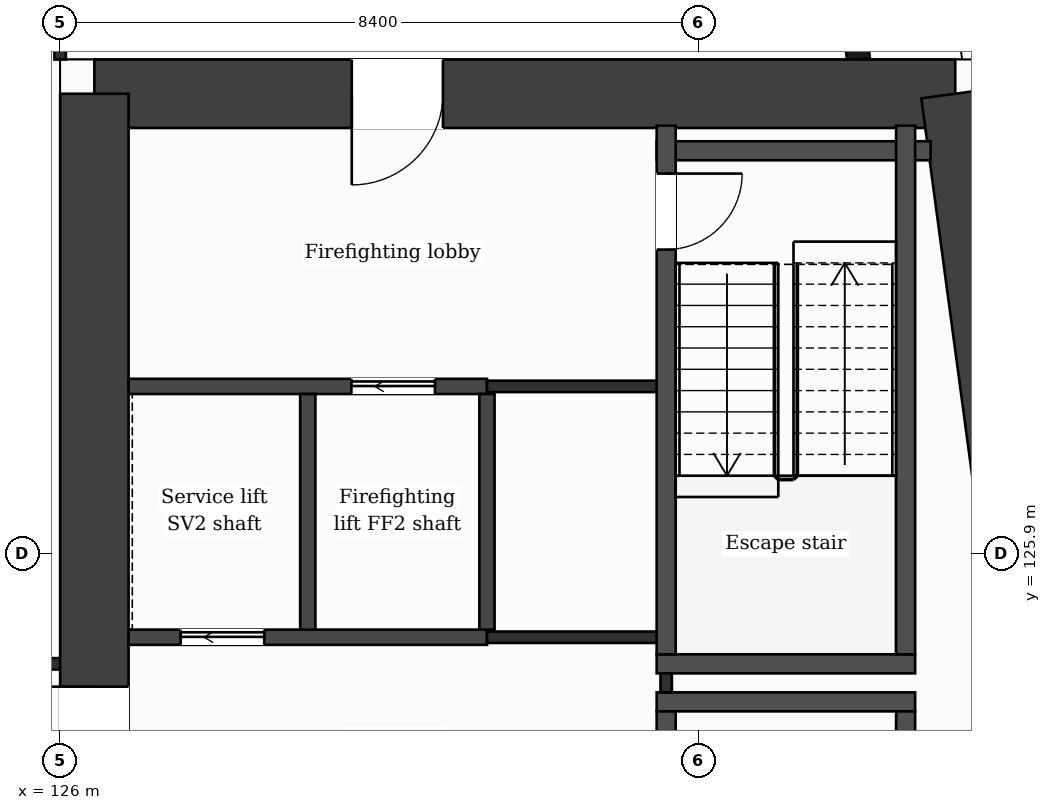
"""IFC4 building model, lengths in metres.
Left out: names, types, materials, properties, quantities, classifications, styles, units other than length and angle.
Written with IfcOpenShell. Run it as: python <this file> out.ifc"""

import sys

from ifc_helpers import new_model, si_unit, direction, frame, frame_2d, origin, place, context, subcontext, project, spatial, rectangle, extrude, element, fill, save


model = new_model("IFC4")
c1 = context("Model", 3, precision=1e-05, world=origin(), true_north=direction((0.0, 1.0)))
c2 = subcontext(c1, "Body", "Model", "MODEL_VIEW")
j1 = project(units=[si_unit("LENGTHUNIT", "METRE"), si_unit("PLANEANGLEUNIT", "RADIAN")], contexts=[c1])
p1 = place(None, origin())
s1 = spatial("IfcSite", under=j1, at=p1, CompositionType="ELEMENT")
p2 = place(p1, origin())
s2 = spatial("IfcBuilding", under=s1, at=p2, CompositionType="ELEMENT")
p3 = place(p2, frame((0.0, 0.0, 181.1)))
s3 = spatial("IfcBuildingStorey", under=s2, at=p3, CompositionType="ELEMENT", Elevation=181.1)
p4 = place(p3, frame((126.45, 131.95, 0.0), z_axis=(0.0, 0.0, 1.0), x_axis=(1.0, 0.0, 0.0)))
e1 = element("IfcWall", 1, at=p4, inside=s3, PredefinedType="SHEAR", context=c2, shape_type="SweptSolid", body=[
    extrude(rectangle(XDim=11.326, YDim=0.9, at=frame_2d((5.663, 0.0))), origin(), (0.0, 0.0, 1.0), 3.7),
])
p5 = place(p4, frame((3.386, 0.0, 0.0)))
e2 = element("IfcOpeningElement", 2, at=p5, cuts=e1, PredefinedType="OPENING", context=c2, shape_type="SweptSolid", body=[
    extrude(rectangle(XDim=1.2, YDim=2.1, at=frame_2d((0.6, 1.05))), frame((0.0, 0.46, 0.0), z_axis=(0.0, -1.0, 0.0), x_axis=(1.0, 0.0, 0.0)), (0.0, 0.0, 1.0), 0.92),
])
p6 = place(p3, frame((137.776, 131.95, 0.0), z_axis=(0.0, 0.0, 1.0), x_axis=(0.133421759112, -0.991059349482, 0.0)))
e3 = element("IfcWall", 3, at=p6, inside=s3, PredefinedType="SHEAR", context=c2, shape_type="SweptSolid", body=[
    extrude(rectangle(XDim=21.29, YDim=0.9, at=frame_2d((10.645, 0.0))), origin(), (0.0, 0.0, 1.0), 3.7),
])
p7 = place(p3, frame((126.45, 110.85, 0.0), z_axis=(0.0, 0.0, 1.0), x_axis=(0.0, 1.0, 0.0)))
e4 = element("IfcWall", 4, at=p7, inside=s3, PredefinedType="SHEAR", context=c2, shape_type="SweptSolid", body=[
    extrude(rectangle(XDim=21.1, YDim=0.9, at=frame_2d((10.55, 0.0))), origin(), (0.0, 0.0, 1.0), 3.7),
])
p8 = place(p7, frame((11.9, 0.0, 0.0)))
e5 = element("IfcOpeningElement", 5, at=p8, cuts=e4, PredefinedType="OPENING", context=c2, shape_type="SweptSolid", body=[
    extrude(rectangle(XDim=1.4, YDim=2.1, at=frame_2d((0.7, 1.05))), frame((0.0, 0.46, 0.0), z_axis=(0.0, -1.0, 0.0), x_axis=(1.0, 0.0, 0.0)), (0.0, 0.0, 1.0), 0.92),
])
p9 = place(p3, frame((136.504, 132.4, 0.0), z_axis=(0.0, 0.0, 1.0), x_axis=(-0.133399697462, 0.99106231929, 0.0)))
e6 = element("IfcWall", 6, at=p9, inside=s3, PredefinedType="SOLIDWALL", context=c2, shape_type="SweptSolid", body=[
    extrude(rectangle(XDim=6.74, YDim=0.3, at=frame_2d((3.37, 0.0))), origin(), (0.0, 0.0, 1.0), 3.38),
])
p10 = place(p9, frame((1.115, 0.0, 0.0)))
e7 = element("IfcOpeningElement", 7, at=p10, cuts=e6, PredefinedType="OPENING", context=c2, shape_type="SweptSolid", body=[
    extrude(rectangle(XDim=1.2, YDim=2.4, at=frame_2d((0.6, 1.2))), frame((0.0, 0.16, 0.0), z_axis=(0.0, -1.0, 0.0), x_axis=(1.0, 0.0, 0.0)), (0.0, 0.0, 1.0), 0.32),
])
p11 = place(p9, frame((3.835, 0.0, 0.9)))
e8 = element("IfcOpeningElement", 8, at=p11, cuts=e6, PredefinedType="OPENING", context=c2, shape_type="SweptSolid", body=[
    extrude(rectangle(XDim=2.4, YDim=2.1, at=frame_2d((1.2, 1.05))), frame((0.0, 0.16, 0.0), z_axis=(0.0, -1.0, 0.0), x_axis=(1.0, 0.0, 0.0)), (0.0, 0.0, 1.0), 0.32),
])
for number, where, z_axis, x_axis in (
    (9, (133.848, 123.95, 0.0), (0.0, 0.0, 1.0), (1.0, 0.0, 0.0)),
    (10, (133.848, 124.45, 0.0), (0.0, 0.0, 1.0), (1.0, 0.0, 0.0)),
):
    element("IfcWall", number, at=place(p3, frame(where, z_axis=z_axis, x_axis=x_axis)), inside=s3, PredefinedType="PARTITIONING", context=c2, shape_type="SweptSolid", body=[
        extrude(rectangle(XDim=3.4, YDim=0.25, at=frame_2d((1.7, 0.0))), origin(), (0.0, 0.0, 1.0), 3.38),
    ])
p12 = place(p3, frame((100.8, 124.45, 0.0), z_axis=(0.0, 0.0, 1.0), x_axis=(1.0, 0.0, 0.0)))
e11 = element("IfcWall", 11, at=p12, inside=s3, PredefinedType="PARTITIONING", context=c2, shape_type="SweptSolid", body=[
    extrude(rectangle(XDim=25.2, YDim=0.15, at=frame_2d((12.6, 0.0))), origin(), (0.0, 0.0, 1.0), 3.38),
])
p13 = place(p12, frame((0.975, 0.0, 0.0)))
e12 = element("IfcOpeningElement", 12, at=p13, cuts=e11, PredefinedType="OPENING", context=c2, shape_type="SweptSolid", body=[
    extrude(rectangle(XDim=1.0, YDim=2.1, at=frame_2d((0.5, 1.05))), frame((0.0, 0.085, 0.0), z_axis=(0.0, -1.0, 0.0), x_axis=(1.0, 0.0, 0.0)), (0.0, 0.0, 1.0), 0.17),
])
p14 = place(p12, frame((6.05, 0.0, 0.0)))
e13 = element("IfcOpeningElement", 13, at=p14, cuts=e11, PredefinedType="OPENING", context=c2, shape_type="SweptSolid", body=[
    extrude(rectangle(XDim=1.0, YDim=2.1, at=frame_2d((0.5, 1.05))), frame((0.0, 0.085, 0.0), z_axis=(0.0, -1.0, 0.0), x_axis=(1.0, 0.0, 0.0)), (0.0, 0.0, 1.0), 0.17),
])
p15 = place(p12, frame((9.27, 0.0, 0.0)))
e14 = element("IfcOpeningElement", 14, at=p15, cuts=e11, PredefinedType="OPENING", context=c2, shape_type="SweptSolid", body=[
    extrude(rectangle(XDim=1.0, YDim=2.1, at=frame_2d((0.5, 1.05))), frame((0.0, 0.085, 0.0), z_axis=(0.0, -1.0, 0.0), x_axis=(1.0, 0.0, 0.0)), (0.0, 0.0, 1.0), 0.17),
])
p16 = place(p12, frame((14.2, 0.0, 0.0)))
e15 = element("IfcOpeningElement", 15, at=p16, cuts=e11, PredefinedType="OPENING", context=c2, shape_type="SweptSolid", body=[
    extrude(rectangle(XDim=1.0, YDim=2.1, at=frame_2d((0.5, 1.05))), frame((0.0, 0.085, 0.0), z_axis=(0.0, -1.0, 0.0), x_axis=(1.0, 0.0, 0.0)), (0.0, 0.0, 1.0), 0.17),
])
p17 = place(p12, frame((18.825, 0.0, 0.0)))
e16 = element("IfcOpeningElement", 16, at=p17, cuts=e11, PredefinedType="OPENING", context=c2, shape_type="SweptSolid", body=[
    extrude(rectangle(XDim=1.0, YDim=2.1, at=frame_2d((0.5, 1.05))), frame((0.0, 0.085, 0.0), z_axis=(0.0, -1.0, 0.0), x_axis=(1.0, 0.0, 0.0)), (0.0, 0.0, 1.0), 0.17),
])
p18 = place(p3, frame((126.9, 124.8, 0.0), z_axis=(0.0, 0.0, 1.0), x_axis=(1.0, 0.0, 0.0)))
e17 = element("IfcWall", 17, at=p18, inside=s3, PredefinedType="PARTITIONING", context=c2, shape_type="SweptSolid", body=[
    extrude(rectangle(XDim=4.715, YDim=0.2, at=frame_2d((2.358, 0.0))), origin(), (0.0, 0.0, 1.0), 3.38),
])
p19 = place(p18, frame((0.685, 0.0, 0.0)))
e18 = element("IfcOpeningElement", 18, at=p19, cuts=e17, PredefinedType="OPENING", context=c2, shape_type="SweptSolid", body=[
    extrude(rectangle(XDim=1.1, YDim=2.1, at=frame_2d((0.55, 1.05))), frame((0.0, 0.11, 0.0), z_axis=(0.0, -1.0, 0.0), x_axis=(1.0, 0.0, 0.0)), (0.0, 0.0, 1.0), 0.22),
])
p20 = place(p3, frame((131.615, 124.8, 0.0), z_axis=(0.0, 0.0, 1.0), x_axis=(1.0, 0.0, 0.0)))
e19 = element("IfcWall", 19, at=p20, inside=s3, PredefinedType="PARTITIONING", context=c2, shape_type="SweptSolid", body=[
    extrude(rectangle(XDim=2.483, YDim=0.15, at=frame_2d((1.241, 0.0))), origin(), (0.0, 0.0, 1.0), 3.38),
])
p21 = place(p3, frame((126.9, 128.1, 0.0), z_axis=(0.0, 0.0, 1.0), x_axis=(1.0, 0.0, 0.0)))
e20 = element("IfcWall", 20, at=p21, inside=s3, PredefinedType="PARTITIONING", context=c2, shape_type="SweptSolid", body=[
    extrude(rectangle(XDim=4.715, YDim=0.2, at=frame_2d((2.358, 0.0))), origin(), (0.0, 0.0, 1.0), 3.38),
])
p22 = place(p21, frame((2.931, 0.0, 0.0)))
e21 = element("IfcOpeningElement", 21, at=p22, cuts=e20, PredefinedType="OPENING", context=c2, shape_type="SweptSolid", body=[
    extrude(rectangle(XDim=1.1, YDim=2.1, at=frame_2d((0.55, 1.05))), frame((0.0, 0.11, 0.0), z_axis=(0.0, -1.0, 0.0), x_axis=(1.0, 0.0, 0.0)), (0.0, 0.0, 1.0), 0.22),
])
p23 = place(p3, frame((131.615, 128.1, 0.0), z_axis=(0.0, 0.0, 1.0), x_axis=(1.0, 0.0, 0.0)))
e22 = element("IfcWall", 22, at=p23, inside=s3, PredefinedType="PARTITIONING", context=c2, shape_type="SweptSolid", body=[
    extrude(rectangle(XDim=2.358, YDim=0.15, at=frame_2d((1.179, 0.0))), origin(), (0.0, 0.0, 1.0), 3.38),
])
p24 = place(p3, frame((133.848, 131.2, 0.0), z_axis=(0.0, 0.0, 1.0), x_axis=(1.0, 0.0, 0.0)))
e23 = element("IfcWall", 23, at=p24, inside=s3, PredefinedType="PARTITIONING", context=c2, shape_type="SweptSolid", body=[
    extrude(rectangle(XDim=3.605, YDim=0.25, at=frame_2d((1.802, 0.0))), origin(), (0.0, 0.0, 1.0), 3.38),
])
p25 = place(p3, frame((126.0, 132.4, 0.0), z_axis=(0.0, 0.0, 1.0), x_axis=(0.0, 1.0, 0.0)))
e24 = element("IfcWall", 24, at=p25, inside=s3, PredefinedType="PARTITIONING", context=c2, shape_type="SweptSolid", body=[
    extrude(rectangle(XDim=1.325, YDim=0.15, at=frame_2d((0.663, 0.0))), origin(), (0.0, 0.0, 1.0), 3.38),
])
for number, where, z_axis, x_axis in (
    (25, (129.258, 124.9, 0.0), (0.0, 0.0, 1.0), (0.0, 1.0, 0.0)),
    (26, (131.615, 124.9, 0.0), (0.0, 0.0, 1.0), (0.0, 1.0, 0.0)),
):
    element("IfcWall", number, at=place(p3, frame(where, z_axis=z_axis, x_axis=x_axis)), inside=s3, PredefinedType="PARTITIONING", context=c2, shape_type="SweptSolid", body=[
        extrude(rectangle(XDim=3.1, YDim=0.2, at=frame_2d((1.55, 0.0))), origin(), (0.0, 0.0, 1.0), 3.38),
    ])
p26 = place(p3, frame((133.973, 124.075, 0.0), z_axis=(0.0, 0.0, 1.0), x_axis=(0.0, 1.0, 0.0)))
e27 = element("IfcWall", 27, at=p26, inside=s3, PredefinedType="PARTITIONING", context=c2, shape_type="SweptSolid", body=[
    extrude(rectangle(XDim=0.25, YDim=0.15, at=frame_2d((0.125, 0.0))), origin(), (0.0, 0.0, 1.0), 3.38),
])
p27 = place(p3, frame((133.973, 116.87, 0.0), z_axis=(0.0, 0.0, 1.0), x_axis=(0.0, 1.0, 0.0)))
e28 = element("IfcWall", 28, at=p27, inside=s3, PredefinedType="PARTITIONING", context=c2, shape_type="SweptSolid", body=[
    extrude(rectangle(XDim=6.955, YDim=0.25, at=frame_2d((3.478, 0.0))), origin(), (0.0, 0.0, 1.0), 3.38),
])
p28 = place(p27, frame((5.655, 0.0, 0.0)))
e29 = element("IfcOpeningElement", 29, at=p28, cuts=e28, PredefinedType="OPENING", context=c2, shape_type="SweptSolid", body=[
    extrude(rectangle(XDim=0.95, YDim=2.1, at=frame_2d((0.475, 1.05))), frame((0.0, 0.135, 0.0), z_axis=(0.0, -1.0, 0.0), x_axis=(1.0, 0.0, 0.0)), (0.0, 0.0, 1.0), 0.27),
])
p29 = place(p3, frame((133.973, 124.575, 0.0), z_axis=(0.0, 0.0, 1.0), x_axis=(0.0, 1.0, 0.0)))
e30 = element("IfcWall", 30, at=p29, inside=s3, PredefinedType="PARTITIONING", context=c2, shape_type="SweptSolid", body=[
    extrude(rectangle(XDim=6.955, YDim=0.25, at=frame_2d((3.478, 0.0))), origin(), (0.0, 0.0, 1.0), 3.38),
])
p30 = place(p29, frame((5.325, 0.0, 0.0)))
e31 = element("IfcOpeningElement", 31, at=p30, cuts=e30, PredefinedType="OPENING", context=c2, shape_type="SweptSolid", body=[
    extrude(rectangle(XDim=1.0, YDim=2.1, at=frame_2d((0.5, 1.05))), frame((0.0, 0.135, 0.0), z_axis=(0.0, -1.0, 0.0), x_axis=(1.0, 0.0, 0.0)), (0.0, 0.0, 1.0), 0.27),
])
p31 = place(p3, frame((137.123, 116.87, 0.0), z_axis=(0.0, 0.0, 1.0), x_axis=(0.0, 1.0, 0.0)))
e32 = element("IfcWall", 32, at=p31, inside=s3, PredefinedType="PARTITIONING", context=c2, shape_type="SweptSolid", body=[
    extrude(rectangle(XDim=6.955, YDim=0.25, at=frame_2d((3.478, 0.0))), origin(), (0.0, 0.0, 1.0), 3.38),
])
p32 = place(p3, frame((137.123, 124.575, 0.0), z_axis=(0.0, 0.0, 1.0), x_axis=(0.0, 1.0, 0.0)))
e33 = element("IfcWall", 33, at=p32, inside=s3, PredefinedType="PARTITIONING", context=c2, shape_type="SweptSolid", body=[
    extrude(rectangle(XDim=6.955, YDim=0.25, at=frame_2d((3.478, 0.0))), origin(), (0.0, 0.0, 1.0), 3.38),
])
p33 = place(p22, origin())
e34 = element("IfcDoor", 34, at=p33, inside=s3, OperationType="SLIDING_TO_LEFT", PredefinedType="DOOR", context=c2, shape_type="SweptSolid", body=[
    extrude(rectangle(XDim=1.1, YDim=2.1, at=frame_2d((0.55, 1.05))), frame((0.0, 0.025, 0.0), z_axis=(0.0, -1.0, 0.0), x_axis=(1.0, 0.0, 0.0)), (0.0, 0.0, 1.0), 0.05),
])
fill(e21, e34)
p34 = place(p19, origin())
e35 = element("IfcDoor", 35, at=p34, inside=s3, OperationType="SLIDING_TO_LEFT", PredefinedType="DOOR", context=c2, shape_type="SweptSolid", body=[
    extrude(rectangle(XDim=1.1, YDim=2.1, at=frame_2d((0.55, 1.05))), frame((0.0, 0.025, 0.0), z_axis=(0.0, -1.0, 0.0), x_axis=(1.0, 0.0, 0.0)), (0.0, 0.0, 1.0), 0.05),
])
fill(e18, e35)
p35 = place(p30, origin())
e36 = element("IfcDoor", 36, at=p35, inside=s3, OperationType="SINGLE_SWING_RIGHT", PredefinedType="DOOR", context=c2, shape_type="SweptSolid", body=[
    extrude(rectangle(XDim=1.0, YDim=2.1, at=frame_2d((0.5, 1.05))), frame((0.0, 0.025, 0.0), z_axis=(0.0, -1.0, 0.0), x_axis=(1.0, 0.0, 0.0)), (0.0, 0.0, 1.0), 0.05),
])
fill(e31, e36)
p36 = place(p5, origin())
e37 = element("IfcDoor", 37, at=p36, inside=s3, OperationType="SINGLE_SWING_LEFT", PredefinedType="DOOR", context=c2, shape_type="SweptSolid", body=[
    extrude(rectangle(XDim=1.2, YDim=2.1, at=frame_2d((0.6, 1.05))), frame((0.0, 0.025, 0.0), z_axis=(0.0, -1.0, 0.0), x_axis=(1.0, 0.0, 0.0)), (0.0, 0.0, 1.0), 0.05),
])
fill(e2, e37)
p37 = place(p8, origin())
e38 = element("IfcDoor", 38, at=p37, inside=s3, OperationType="SINGLE_SWING_RIGHT", PredefinedType="DOOR", context=c2, shape_type="SweptSolid", body=[
    extrude(rectangle(XDim=1.4, YDim=2.1, at=frame_2d((0.7, 1.05))), frame((0.0, 0.025, 0.0), z_axis=(0.0, -1.0, 0.0), x_axis=(1.0, 0.0, 0.0)), (0.0, 0.0, 1.0), 0.05),
])
fill(e5, e38)
save(model, sys.argv[1])
